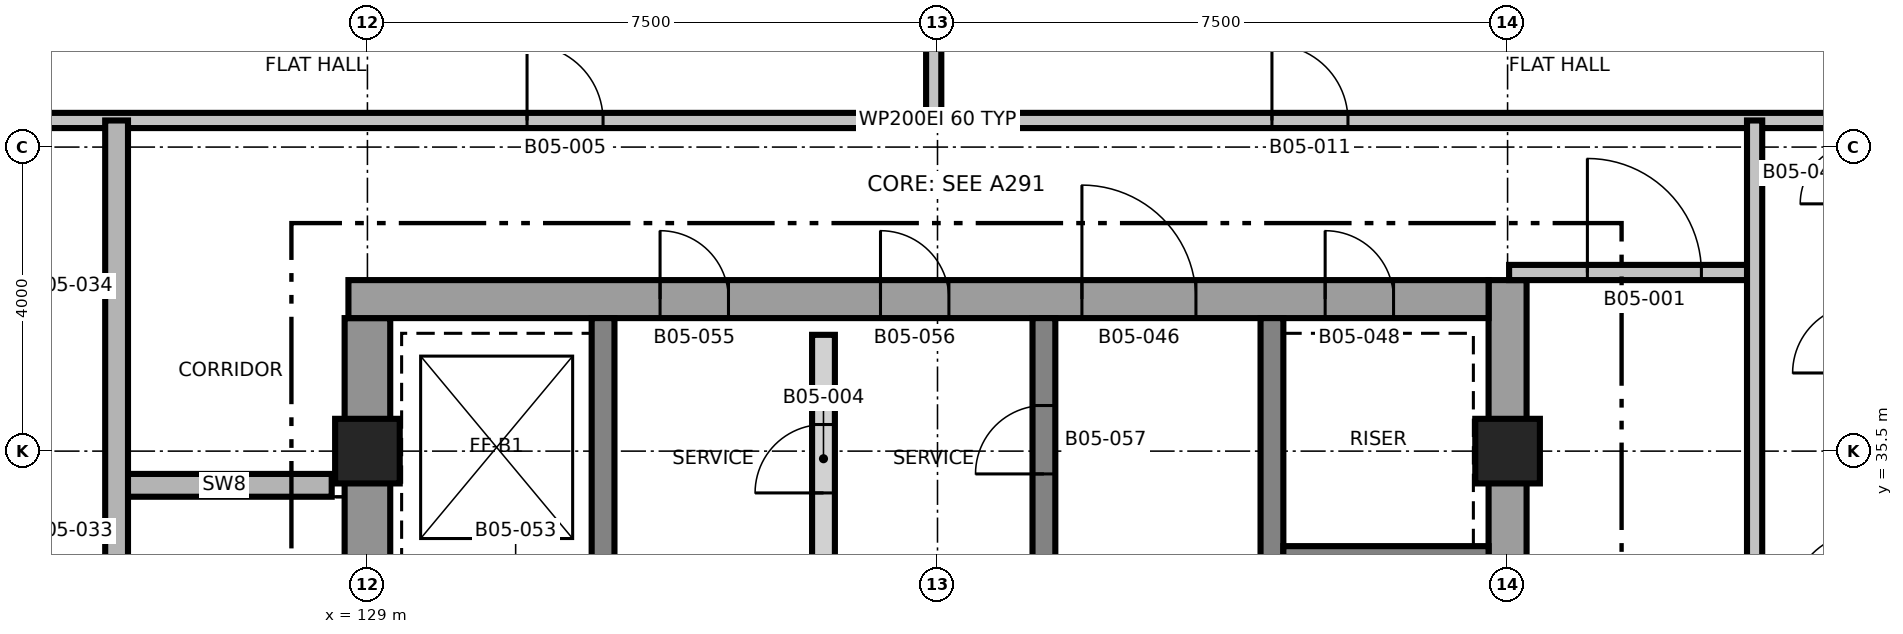
"""IFC4 building model, lengths in metres.
Left out: names, types, materials, properties, quantities, classifications, styles, units other than length and angle.
Written with IfcOpenShell. Run it as: python <this file> out.ifc"""

import sys

from ifc_helpers import new_model, si_unit, direction, frame, frame_2d, origin, origin_2d, place, context, subcontext, project, spatial, rectangle, extrude, element, fill, save


model = new_model("IFC4")
c1 = context("Model", 3, precision=1e-05, world=origin(), true_north=direction((0.0, 1.0)))
c2 = subcontext(c1, "Body", "Model", "MODEL_VIEW")
j1 = project(units=[si_unit("LENGTHUNIT", "METRE"), si_unit("PLANEANGLEUNIT", "RADIAN")], contexts=[c1])
p1 = place(None, origin())
s1 = spatial("IfcSite", under=j1, at=p1, CompositionType="ELEMENT")
p2 = place(p1, origin())
s2 = spatial("IfcBuilding", under=s1, at=p2, CompositionType="ELEMENT")
p3 = place(p2, frame((0.0, 0.0, 74.2)))
s3 = spatial("IfcBuildingStorey", under=s2, at=p3, CompositionType="ELEMENT", Elevation=74.2)
p4 = place(p3, frame((129.0, 24.75, 0.0), z_axis=(0.0, 0.0, 1.0), x_axis=(0.0, 1.0, 0.0)))
e1 = element("IfcWall", 1, at=p4, inside=s3, PredefinedType="SHEAR", context=c2, shape_type="SweptSolid", body=[
    extrude(rectangle(XDim=12.5, YDim=0.6, at=frame_2d((6.25, 0.0))), origin(), (0.0, 0.0, 1.0), 3.7),
])
p5 = place(p4, frame((5.15, 0.0, 0.0)))
e2 = element("IfcOpeningElement", 2, at=p5, cuts=e1, PredefinedType="OPENING", context=c2, shape_type="SweptSolid", body=[
    extrude(rectangle(XDim=1.0, YDim=2.1, at=frame_2d((0.5, 1.05))), frame((0.0, 0.31, 0.0), z_axis=(0.0, -1.0, 0.0), x_axis=(1.0, 0.0, 0.0)), (0.0, 0.0, 1.0), 0.62),
])
p6 = place(p3, frame((144.0, 24.25, 0.0), z_axis=(0.0, 0.0, 1.0), x_axis=(0.0, 1.0, 0.0)))
e3 = element("IfcWall", 3, at=p6, inside=s3, PredefinedType="SHEAR", context=c2, shape_type="SweptSolid", body=[
    extrude(rectangle(XDim=13.5, YDim=0.5, at=frame_2d((6.75, 0.0))), origin(), (0.0, 0.0, 1.0), 3.7),
])
p7 = place(p3, frame((128.75, 37.5, 0.0), z_axis=(0.0, 0.0, 1.0), x_axis=(1.0, 0.0, 0.0)))
e4 = element("IfcWall", 4, at=p7, inside=s3, PredefinedType="SHEAR", context=c2, shape_type="SweptSolid", body=[
    extrude(rectangle(XDim=15.0, YDim=0.5, at=frame_2d((7.5, 0.0))), origin(), (0.0, 0.0, 1.0), 3.7),
])
p8 = place(p7, frame((9.65, 0.0, 0.0)))
e5 = element("IfcOpeningElement", 5, at=p8, cuts=e4, PredefinedType="OPENING", context=c2, shape_type="SweptSolid", body=[
    extrude(rectangle(XDim=1.5, YDim=2.1, at=frame_2d((0.75, 1.05))), frame((0.0, 0.26, 0.0), z_axis=(0.0, -1.0, 0.0), x_axis=(1.0, 0.0, 0.0)), (0.0, 0.0, 1.0), 0.52),
])
p9 = place(p7, frame((12.85, 0.0, 0.0)))
e6 = element("IfcOpeningElement", 6, at=p9, cuts=e4, PredefinedType="OPENING", context=c2, shape_type="SweptSolid", body=[
    extrude(rectangle(XDim=0.9, YDim=2.1, at=frame_2d((0.45, 1.05))), frame((0.0, 0.26, 0.0), z_axis=(0.0, -1.0, 0.0), x_axis=(1.0, 0.0, 0.0)), (0.0, 0.0, 1.0), 0.52),
])
p10 = place(p7, frame((4.1, 0.0, 0.0)))
e7 = element("IfcOpeningElement", 7, at=p10, cuts=e4, PredefinedType="OPENING", context=c2, shape_type="SweptSolid", body=[
    extrude(rectangle(XDim=0.9, YDim=2.1, at=frame_2d((0.45, 1.05))), frame((0.0, 0.26, 0.0), z_axis=(0.0, -1.0, 0.0), x_axis=(1.0, 0.0, 0.0)), (0.0, 0.0, 1.0), 0.52),
])
p11 = place(p7, frame((7.0, 0.0, 0.0)))
e8 = element("IfcOpeningElement", 8, at=p11, cuts=e4, PredefinedType="OPENING", context=c2, shape_type="SweptSolid", body=[
    extrude(rectangle(XDim=0.9, YDim=2.1, at=frame_2d((0.45, 1.05))), frame((0.0, 0.26, 0.0), z_axis=(0.0, -1.0, 0.0), x_axis=(1.0, 0.0, 0.0)), (0.0, 0.0, 1.0), 0.52),
])
p12 = place(p3, frame((132.1, 24.75, 0.0), z_axis=(0.0, 0.0, 1.0), x_axis=(0.0, 1.0, 0.0)))
e9 = element("IfcWall", 9, at=p12, inside=s3, PredefinedType="SHEAR", context=c2, shape_type="SweptSolid", body=[
    extrude(rectangle(XDim=12.5, YDim=0.3, at=frame_2d((6.25, 0.0))), origin(), (0.0, 0.0, 1.0), 3.7),
])
p13 = place(p12, frame((3.9, 0.0, 0.0)))
e10 = element("IfcOpeningElement", 10, at=p13, cuts=e9, PredefinedType="OPENING", context=c2, shape_type="SweptSolid", body=[
    extrude(rectangle(XDim=1.2, YDim=2.1, at=frame_2d((0.6, 1.05))), frame((0.0, 0.16, 0.0), z_axis=(0.0, -1.0, 0.0), x_axis=(1.0, 0.0, 0.0)), (0.0, 0.0, 1.0), 0.32),
])
p14 = place(p3, frame((137.9, 24.75, 0.0), z_axis=(0.0, 0.0, 1.0), x_axis=(0.0, 1.0, 0.0)))
e11 = element("IfcWall", 11, at=p14, inside=s3, PredefinedType="SHEAR", context=c2, shape_type="SweptSolid", body=[
    extrude(rectangle(XDim=12.5, YDim=0.3, at=frame_2d((6.25, 0.0))), origin(), (0.0, 0.0, 1.0), 3.7),
])
p15 = place(p14, frame((3.95, 0.0, 0.0)))
e12 = element("IfcOpeningElement", 12, at=p15, cuts=e11, PredefinedType="OPENING", context=c2, shape_type="SweptSolid", body=[
    extrude(rectangle(XDim=1.5, YDim=2.1, at=frame_2d((0.75, 1.05))), frame((0.0, 0.16, 0.0), z_axis=(0.0, -1.0, 0.0), x_axis=(1.0, 0.0, 0.0)), (0.0, 0.0, 1.0), 0.32),
])
p16 = place(p14, frame((10.45, 0.0, 0.0)))
e13 = element("IfcOpeningElement", 13, at=p16, cuts=e11, PredefinedType="OPENING", context=c2, shape_type="SweptSolid", body=[
    extrude(rectangle(XDim=0.9, YDim=2.1, at=frame_2d((0.45, 1.05))), frame((0.0, 0.16, 0.0), z_axis=(0.0, -1.0, 0.0), x_axis=(1.0, 0.0, 0.0)), (0.0, 0.0, 1.0), 0.32),
])
p17 = place(p3, frame((140.9, 24.75, 0.0), z_axis=(0.0, 0.0, 1.0), x_axis=(0.0, 1.0, 0.0)))
e14 = element("IfcWall", 14, at=p17, inside=s3, PredefinedType="SHEAR", context=c2, shape_type="SweptSolid", body=[
    extrude(rectangle(XDim=12.5, YDim=0.3, at=frame_2d((6.25, 0.0))), origin(), (0.0, 0.0, 1.0), 3.7),
])
p18 = place(p17, frame((5.9, 0.0, 0.0)))
e15 = element("IfcOpeningElement", 15, at=p18, cuts=e14, PredefinedType="OPENING", context=c2, shape_type="SweptSolid", body=[
    extrude(rectangle(XDim=1.2, YDim=2.1, at=frame_2d((0.6, 1.05))), frame((0.0, 0.16, 0.0), z_axis=(0.0, -1.0, 0.0), x_axis=(1.0, 0.0, 0.0)), (0.0, 0.0, 1.0), 0.32),
])
p19 = place(p3, frame((141.05, 34.1, 0.0), z_axis=(0.0, 0.0, 1.0), x_axis=(1.0, 0.0, 0.0)))
e16 = element("IfcWall", 16, at=p19, inside=s3, PredefinedType="SHEAR", context=c2, shape_type="SweptSolid", body=[
    extrude(rectangle(XDim=2.7, YDim=0.3, at=frame_2d((1.35, 0.0))), origin(), (0.0, 0.0, 1.0), 3.7),
])
for number, where, z_axis, x_axis in (
    (17, (129.0, 35.5, 0.0), (0.0, 0.0, 1.0), (1.0, 0.0, 0.0)),
    (18, (144.0, 35.5, 0.0), (0.0, 0.0, 1.0), (1.0, 0.0, 0.0)),
):
    element("IfcColumn", number, at=place(p3, frame(where, z_axis=z_axis, x_axis=x_axis)), inside=s3, PredefinedType="COLUMN", context=c2, shape_type="SweptSolid", body=[
        extrude(rectangle(XDim=0.85, YDim=0.85, at=origin_2d()), origin(), (0.0, 0.0, 1.0), 3.7),
    ])
p20 = place(p3, frame((125.7, 35.05, 0.0), z_axis=(0.0, 0.0, 1.0), x_axis=(1.0, 0.0, 0.0)))
e19 = element("IfcWall", 19, at=p20, inside=s3, PredefinedType="SHEAR", context=c2, shape_type="SweptSolid", body=[
    extrude(rectangle(XDim=2.83, YDim=0.3, at=frame_2d((1.415, 0.0))), origin(), (0.0, 0.0, 1.0), 3.4),
])
p21 = place(p3, frame((144.02, 37.85, 0.0), z_axis=(0.0, 0.0, 1.0), x_axis=(1.0, 0.0, 0.0)))
e20 = element("IfcWall", 20, at=p21, inside=s3, PredefinedType="PARTITIONING", context=c2, shape_type="SweptSolid", body=[
    extrude(rectangle(XDim=3.23, YDim=0.2, at=frame_2d((1.615, 0.0))), origin(), (0.0, 0.0, 1.0), 3.4),
])
p22 = place(p21, frame((1.03, 0.0, 0.0)))
e21 = element("IfcOpeningElement", 21, at=p22, cuts=e20, PredefinedType="OPENING", context=c2, shape_type="SweptSolid", body=[
    extrude(rectangle(XDim=1.5, YDim=2.1, at=frame_2d((0.75, 1.05))), frame((0.0, 0.11, 0.0), z_axis=(0.0, -1.0, 0.0), x_axis=(1.0, 0.0, 0.0)), (0.0, 0.0, 1.0), 0.22),
])
p23 = place(p3, frame((120.07, 39.85, 0.0), z_axis=(0.0, 0.0, 1.0), x_axis=(1.0, 0.0, 0.0)))
e22 = element("IfcWall", 22, at=p23, inside=s3, PredefinedType="PARTITIONING", context=c2, shape_type="SweptSolid", body=[
    extrude(rectangle(XDim=32.86, YDim=0.2, at=frame_2d((16.43, 0.0))), origin(), (0.0, 0.0, 1.0), 3.4),
])
p24 = place(p23, frame((11.03, 0.0, 0.0)))
e23 = element("IfcOpeningElement", 23, at=p24, cuts=e22, PredefinedType="OPENING", context=c2, shape_type="SweptSolid", body=[
    extrude(rectangle(XDim=1.0, YDim=2.1, at=frame_2d((0.5, 1.05))), frame((0.0, 0.11, 0.0), z_axis=(0.0, -1.0, 0.0), x_axis=(1.0, 0.0, 0.0)), (0.0, 0.0, 1.0), 0.22),
])
p25 = place(p23, frame((20.83, 0.0, 0.0)))
e24 = element("IfcOpeningElement", 24, at=p25, cuts=e22, PredefinedType="OPENING", context=c2, shape_type="SweptSolid", body=[
    extrude(rectangle(XDim=1.0, YDim=2.1, at=frame_2d((0.5, 1.05))), frame((0.0, 0.11, 0.0), z_axis=(0.0, -1.0, 0.0), x_axis=(1.0, 0.0, 0.0)), (0.0, 0.0, 1.0), 0.22),
])
p26 = place(p3, frame((125.7, 22.15, 0.0), z_axis=(0.0, 0.0, 1.0), x_axis=(0.0, 1.0, 0.0)))
e25 = element("IfcWall", 25, at=p26, inside=s3, PredefinedType="SHEAR", context=c2, shape_type="SweptSolid", body=[
    extrude(rectangle(XDim=17.7, YDim=0.3, at=frame_2d((8.85, 0.0))), origin(), (0.0, 0.0, 1.0), 3.4),
])
p27 = place(p26, frame((2.7, 0.0, 0.0)))
e26 = element("IfcOpeningElement", 26, at=p27, cuts=e25, PredefinedType="OPENING", context=c2, shape_type="SweptSolid", body=[
    extrude(rectangle(XDim=1.0, YDim=2.1, at=frame_2d((0.5, 1.05))), frame((0.0, 0.16, 0.0), z_axis=(0.0, -1.0, 0.0), x_axis=(1.0, 0.0, 0.0)), (0.0, 0.0, 1.0), 0.32),
])
p28 = place(p3, frame((135.0, 33.77, 0.0), z_axis=(0.0, 0.0, 1.0), x_axis=(0.0, 1.0, 0.0)))
e27 = element("IfcWall", 27, at=p28, inside=s3, PredefinedType="PARTITIONING", context=c2, shape_type="SweptSolid", body=[
    extrude(rectangle(XDim=3.26, YDim=0.3, at=frame_2d((1.63, 0.0))), origin(), (0.0, 0.0, 1.0), 3.4),
])
p29 = place(p28, frame((1.18, 0.0, 0.0)))
e28 = element("IfcOpeningElement", 28, at=p29, cuts=e27, PredefinedType="OPENING", context=c2, shape_type="SweptSolid", body=[
    extrude(rectangle(XDim=0.9, YDim=2.1, at=frame_2d((0.45, 1.05))), frame((0.0, 0.16, 0.0), z_axis=(0.0, -1.0, 0.0), x_axis=(1.0, 0.0, 0.0)), (0.0, 0.0, 1.0), 0.32),
])
p30 = place(p3, frame((136.45, 39.85, 0.0), z_axis=(0.0, 0.0, 1.0), x_axis=(0.0, 1.0, 0.0)))
e29 = element("IfcWall", 29, at=p30, inside=s3, PredefinedType="PARTITIONING", context=c2, shape_type="SweptSolid", body=[
    extrude(rectangle(XDim=6.08, YDim=0.2, at=frame_2d((3.04, 0.0))), origin(), (0.0, 0.0, 1.0), 3.4),
])
p31 = place(p3, frame((147.25, 22.15, 0.0), z_axis=(0.0, 0.0, 1.0), x_axis=(0.0, 1.0, 0.0)))
e30 = element("IfcWall", 30, at=p31, inside=s3, PredefinedType="PARTITIONING", context=c2, shape_type="SweptSolid", body=[
    extrude(rectangle(XDim=17.7, YDim=0.2, at=frame_2d((8.85, 0.0))), origin(), (0.0, 0.0, 1.0), 3.4),
])
p32 = place(p31, frame((2.65, 0.0, 0.0)))
e31 = element("IfcOpeningElement", 31, at=p32, cuts=e30, PredefinedType="OPENING", context=c2, shape_type="SweptSolid", body=[
    extrude(rectangle(XDim=1.0, YDim=2.1, at=frame_2d((0.5, 1.05))), frame((0.0, 0.11, 0.0), z_axis=(0.0, -1.0, 0.0), x_axis=(1.0, 0.0, 0.0)), (0.0, 0.0, 1.0), 0.22),
])
p33 = place(p22, origin())
e32 = element("IfcDoor", 32, at=p33, inside=s3, OperationType="SINGLE_SWING_LEFT", PredefinedType="DOOR", context=c2, shape_type="SweptSolid", body=[
    extrude(rectangle(XDim=1.5, YDim=2.1, at=frame_2d((0.75, 1.05))), frame((0.0, 0.025, 0.0), z_axis=(0.0, -1.0, 0.0), x_axis=(1.0, 0.0, 0.0)), (0.0, 0.0, 1.0), 0.05),
])
fill(e21, e32)
p34 = place(p29, origin())
e33 = element("IfcDoor", 33, at=p34, inside=s3, OperationType="SINGLE_SWING_RIGHT", PredefinedType="DOOR", context=c2, shape_type="SweptSolid", body=[
    extrude(rectangle(XDim=0.9, YDim=2.1, at=frame_2d((0.45, 1.05))), frame((0.0, 0.025, 0.0), z_axis=(0.0, -1.0, 0.0), x_axis=(1.0, 0.0, 0.0)), (0.0, 0.0, 1.0), 0.05),
])
fill(e28, e33)
p35 = place(p24, origin())
e34 = element("IfcDoor", 34, at=p35, inside=s3, OperationType="SINGLE_SWING_LEFT", PredefinedType="DOOR", context=c2, shape_type="SweptSolid", body=[
    extrude(rectangle(XDim=1.0, YDim=2.1, at=frame_2d((0.5, 1.05))), frame((0.0, 0.025, 0.0), z_axis=(0.0, -1.0, 0.0), x_axis=(1.0, 0.0, 0.0)), (0.0, 0.0, 1.0), 0.05),
])
fill(e23, e34)
p36 = place(p25, origin())
e35 = element("IfcDoor", 35, at=p36, inside=s3, OperationType="SINGLE_SWING_LEFT", PredefinedType="DOOR", context=c2, shape_type="SweptSolid", body=[
    extrude(rectangle(XDim=1.0, YDim=2.1, at=frame_2d((0.5, 1.05))), frame((0.0, 0.025, 0.0), z_axis=(0.0, -1.0, 0.0), x_axis=(1.0, 0.0, 0.0)), (0.0, 0.0, 1.0), 0.05),
])
fill(e24, e35)
p37 = place(p8, origin())
e36 = element("IfcDoor", 36, at=p37, inside=s3, OperationType="SINGLE_SWING_RIGHT", PredefinedType="DOOR", context=c2, shape_type="SweptSolid", body=[
    extrude(rectangle(XDim=1.5, YDim=2.1, at=frame_2d((0.75, 1.05))), frame((0.0, 0.025, 0.0), z_axis=(0.0, -1.0, 0.0), x_axis=(1.0, 0.0, 0.0)), (0.0, 0.0, 1.0), 0.05),
])
fill(e5, e36)
p38 = place(p9, origin())
e37 = element("IfcDoor", 37, at=p38, inside=s3, OperationType="SINGLE_SWING_RIGHT", PredefinedType="DOOR", context=c2, shape_type="SweptSolid", body=[
    extrude(rectangle(XDim=0.9, YDim=2.1, at=frame_2d((0.45, 1.05))), frame((0.0, 0.025, 0.0), z_axis=(0.0, -1.0, 0.0), x_axis=(1.0, 0.0, 0.0)), (0.0, 0.0, 1.0), 0.05),
])
fill(e6, e37)
p39 = place(p10, origin())
e38 = element("IfcDoor", 38, at=p39, inside=s3, OperationType="SINGLE_SWING_LEFT", PredefinedType="DOOR", context=c2, shape_type="SweptSolid", body=[
    extrude(rectangle(XDim=0.9, YDim=2.1, at=frame_2d((0.45, 1.05))), frame((0.0, 0.025, 0.0), z_axis=(0.0, -1.0, 0.0), x_axis=(1.0, 0.0, 0.0)), (0.0, 0.0, 1.0), 0.05),
])
fill(e7, e38)
p40 = place(p11, origin())
e39 = element("IfcDoor", 39, at=p40, inside=s3, OperationType="SINGLE_SWING_RIGHT", PredefinedType="DOOR", context=c2, shape_type="SweptSolid", body=[
    extrude(rectangle(XDim=0.9, YDim=2.1, at=frame_2d((0.45, 1.05))), frame((0.0, 0.025, 0.0), z_axis=(0.0, -1.0, 0.0), x_axis=(1.0, 0.0, 0.0)), (0.0, 0.0, 1.0), 0.05),
])
fill(e8, e39)
p41 = place(p16, origin())
e40 = element("IfcDoor", 40, at=p41, inside=s3, OperationType="SINGLE_SWING_RIGHT", PredefinedType="DOOR", context=c2, shape_type="SweptSolid", body=[
    extrude(rectangle(XDim=0.9, YDim=2.1, at=frame_2d((0.45, 1.05))), frame((0.0, 0.025, 0.0), z_axis=(0.0, -1.0, 0.0), x_axis=(1.0, 0.0, 0.0)), (0.0, 0.0, 1.0), 0.05),
])
fill(e13, e40)
save(model, sys.argv[1])
